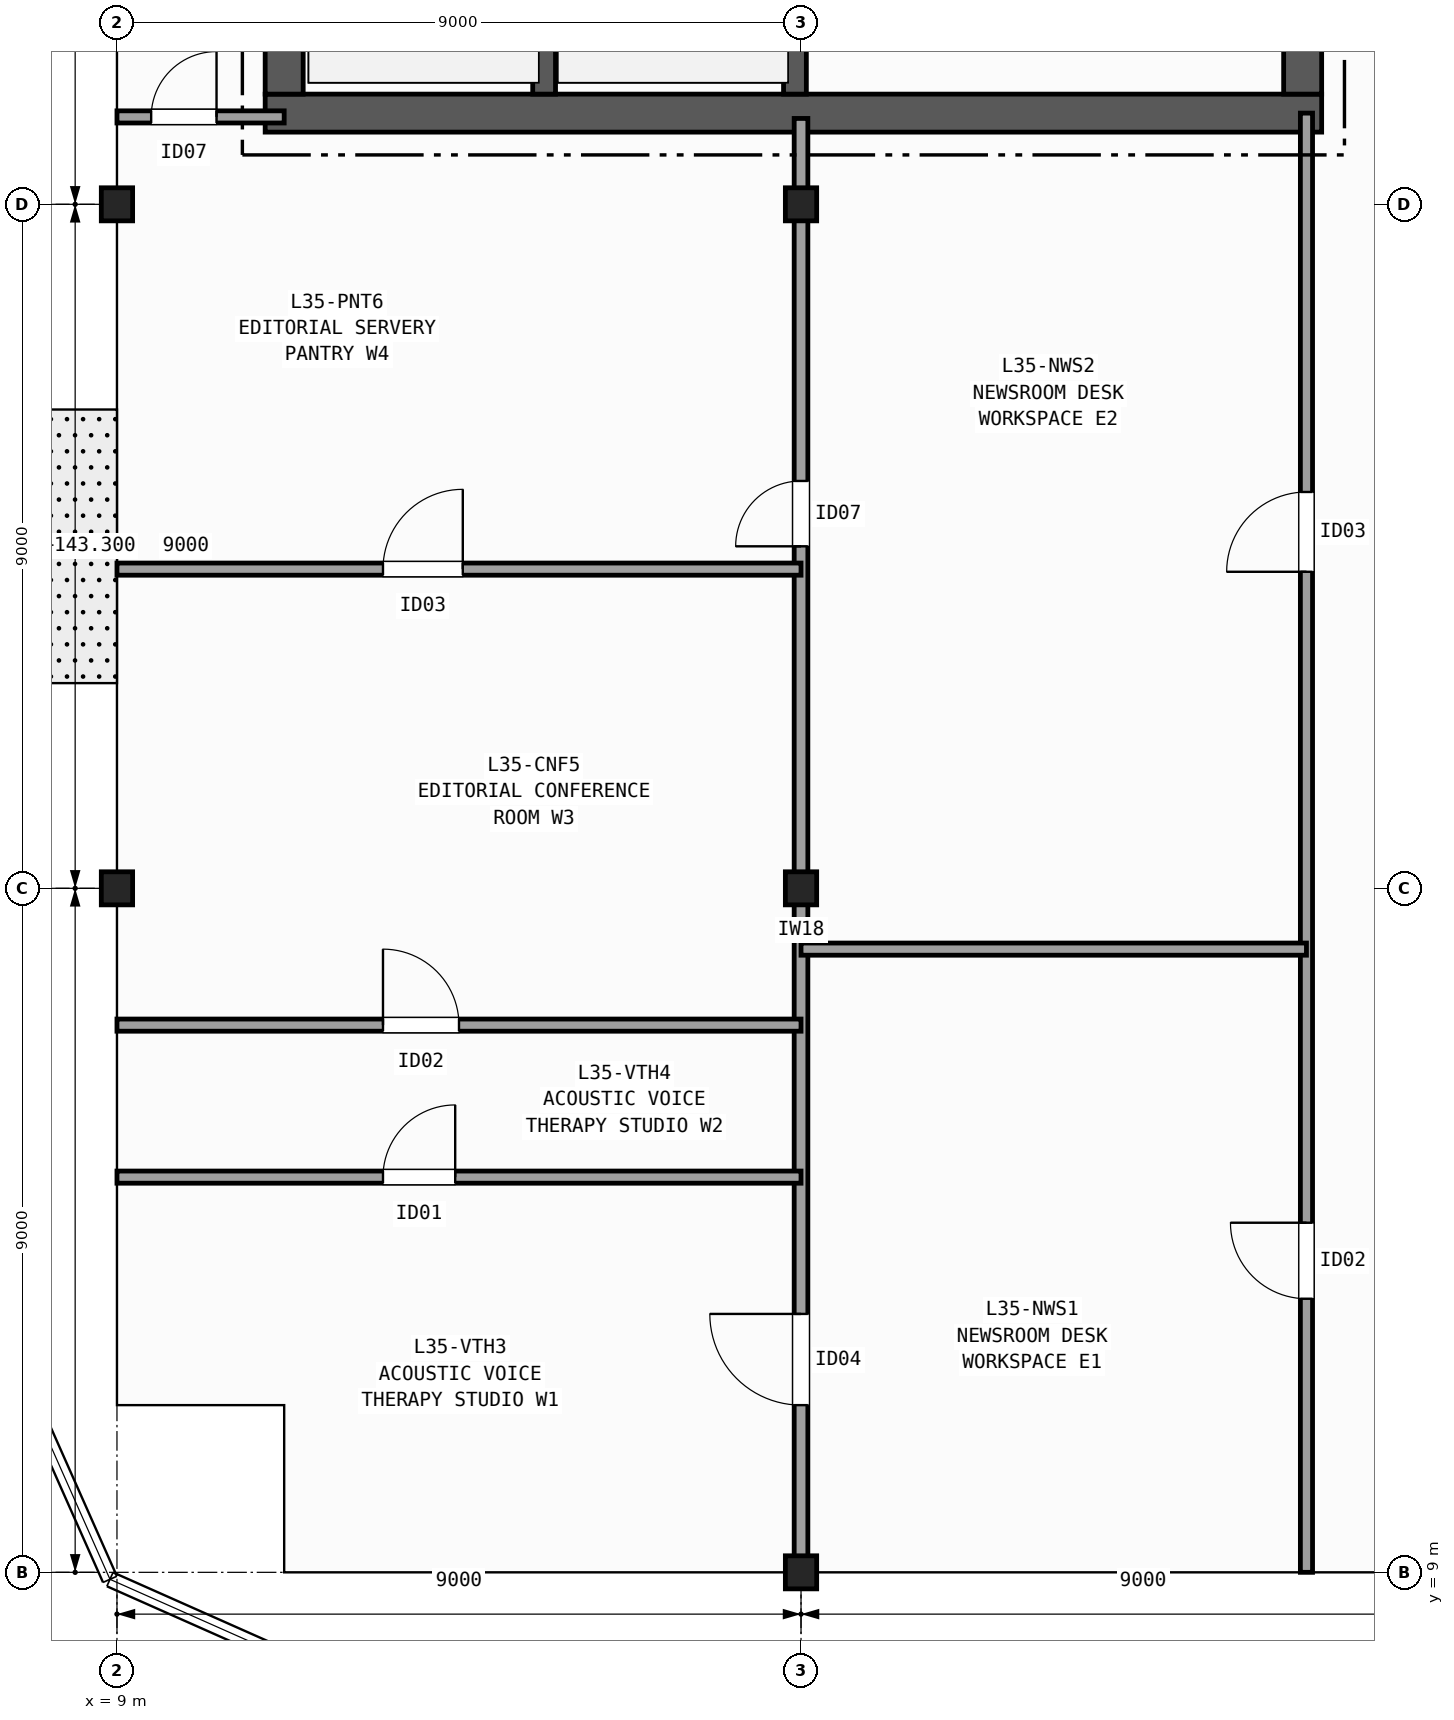
"""IFC4 building model, lengths in metres.
Left out: names, types, materials, properties, quantities, classifications, styles, units other than length and angle.
Written with IfcOpenShell. Run it as: python <this file> out.ifc"""

import sys

from ifc_helpers import new_model, si_unit, direction, frame, frame_2d, origin, origin_2d, place, context, subcontext, project, spatial, rectangle, i_section, extrude, element, fill, save


model = new_model("IFC4")
c1 = context("Model", 3, precision=1e-05, world=origin(), true_north=direction((0.0, 1.0)))
c2 = subcontext(c1, "Body", "Model", "MODEL_VIEW")
j1 = project(units=[si_unit("LENGTHUNIT", "METRE"), si_unit("PLANEANGLEUNIT", "RADIAN")], contexts=[c1])
p1 = place(None, origin())
s1 = spatial("IfcSite", under=j1, at=p1, CompositionType="ELEMENT")
p2 = place(p1, origin())
s2 = spatial("IfcBuilding", under=s1, at=p2, CompositionType="ELEMENT")
p3 = place(p2, frame((0.0, 0.0, 143.3)))
s3 = spatial("IfcBuildingStorey", under=s2, at=p3, CompositionType="ELEMENT", Elevation=143.3)
for number, where, z_axis, x_axis in (
    (1, (9.0, 18.0, 0.0), (0.0, 0.0, 1.0), (1.0, 0.0, 0.0)),
    (2, (9.0, 27.0, 0.0), (0.0, 0.0, 1.0), (1.0, 0.0, 0.0)),
    (3, (18.0, 9.0, 0.0), (0.0, 0.0, 1.0), (1.0, 0.0, 0.0)),
    (4, (18.0, 18.0, 0.0), (0.0, 0.0, 1.0), (1.0, 0.0, 0.0)),
    (5, (18.0, 27.0, 0.0), (0.0, 0.0, 1.0), (1.0, 0.0, 0.0)),
):
    element("IfcColumn", number, at=place(p3, frame(where, z_axis=z_axis, x_axis=x_axis)), inside=s3, PredefinedType="COLUMN", context=c2, shape_type="SweptSolid", body=[
        extrude(i_section(OverallWidth=0.412, OverallDepth=0.435, WebThickness=0.036, FlangeThickness=0.057, FilletRadius=0.015, at=origin_2d()), origin(), (0.0, 0.0, 1.0), 3.7),
    ])
p4 = place(p3, frame((10.95, 28.2, 0.0), z_axis=(0.0, 0.0, 1.0), x_axis=(1.0, 0.0, 0.0)))
e6 = element("IfcWall", 6, at=p4, inside=s3, PredefinedType="SHEAR", context=c2, shape_type="SweptSolid", body=[
    extrude(rectangle(XDim=13.9, YDim=0.5, at=frame_2d((6.95, 0.0))), origin(), (0.0, 0.0, 1.0), 3.42),
])
p5 = place(p3, frame((11.2, 42.15, 0.0), z_axis=(0.0, 0.0, 1.0), x_axis=(0.0, -1.0, 0.0)))
e7 = element("IfcWall", 7, at=p5, inside=s3, PredefinedType="SHEAR", context=c2, shape_type="SweptSolid", body=[
    extrude(rectangle(XDim=13.7, YDim=0.5, at=frame_2d((6.85, 0.0))), origin(), (0.0, 0.0, 1.0), 3.42),
])
p6 = place(p3, frame((24.6, 28.45, 0.0), z_axis=(0.0, 0.0, 1.0), x_axis=(0.0, 1.0, 0.0)))
e8 = element("IfcWall", 8, at=p6, inside=s3, PredefinedType="SHEAR", context=c2, shape_type="SweptSolid", body=[
    extrude(rectangle(XDim=13.7, YDim=0.5, at=frame_2d((6.85, 0.0))), origin(), (0.0, 0.0, 1.0), 3.42),
])
p7 = place(p6, frame((3.35, 0.0, 0.0)))
e9 = element("IfcOpeningElement", 9, at=p7, cuts=e8, PredefinedType="OPENING", context=c2, shape_type="SweptSolid", body=[
    extrude(rectangle(XDim=1.5, YDim=2.2, at=frame_2d((0.75, 1.1))), frame((0.0, 0.26, 0.0), z_axis=(0.0, -1.0, 0.0), x_axis=(1.0, 0.0, 0.0)), (0.0, 0.0, 1.0), 0.52),
])
p8 = place(p6, frame((9.95, 0.0, 0.0)))
e10 = element("IfcOpeningElement", 10, at=p8, cuts=e8, PredefinedType="OPENING", context=c2, shape_type="SweptSolid", body=[
    extrude(rectangle(XDim=0.9, YDim=2.1, at=frame_2d((0.45, 1.05))), frame((0.0, 0.26, 0.0), z_axis=(0.0, -1.0, 0.0), x_axis=(1.0, 0.0, 0.0)), (0.0, 0.0, 1.0), 0.52),
])
p9 = place(p6, frame((12.05, 0.0, 0.0)))
e11 = element("IfcOpeningElement", 11, at=p9, cuts=e8, PredefinedType="OPENING", context=c2, shape_type="SweptSolid", body=[
    extrude(rectangle(XDim=0.9, YDim=2.1, at=frame_2d((0.45, 1.05))), frame((0.0, 0.26, 0.0), z_axis=(0.0, -1.0, 0.0), x_axis=(1.0, 0.0, 0.0)), (0.0, 0.0, 1.0), 0.52),
])
p10 = place(p3, frame((14.62, 28.45, 0.0), z_axis=(0.0, 0.0, 1.0), x_axis=(0.0, 1.0, 0.0)))
e12 = element("IfcWall", 12, at=p10, inside=s3, PredefinedType="SHEAR", context=c2, shape_type="SweptSolid", body=[
    extrude(rectangle(XDim=9.0, YDim=0.3, at=frame_2d((4.5, 0.0))), origin(), (0.0, 0.0, 1.0), 3.42),
])
p11 = place(p3, frame((17.92, 42.15, 0.0), z_axis=(0.0, 0.0, 1.0), x_axis=(0.0, -1.0, 0.0)))
e13 = element("IfcWall", 13, at=p11, inside=s3, PredefinedType="SHEAR", context=c2, shape_type="SweptSolid", body=[
    extrude(rectangle(XDim=13.7, YDim=0.3, at=frame_2d((6.85, 0.0))), origin(), (0.0, 0.0, 1.0), 3.42),
])
p12 = place(p11, frame((1.975, 0.0, 0.0)))
e14 = element("IfcOpeningElement", 14, at=p12, cuts=e13, PredefinedType="OPENING", context=c2, shape_type="SweptSolid", body=[
    extrude(rectangle(XDim=1.15, YDim=2.15, at=frame_2d((0.575, 1.075))), frame((0.0, 0.16, 0.0), z_axis=(0.0, -1.0, 0.0), x_axis=(1.0, 0.0, 0.0)), (0.0, 0.0, 1.0), 0.32),
])
p13 = place(p3, frame((9.0, 28.15, 0.0), z_axis=(0.0, 0.0, 1.0), x_axis=(1.0, 0.0, 0.0)))
e15 = element("IfcWall", 15, at=p13, inside=s3, PredefinedType="PARTITIONING", context=c2, shape_type="SweptSolid", body=[
    extrude(rectangle(XDim=2.2, YDim=0.16, at=frame_2d((1.1, 0.0))), origin(), (0.0, 0.0, 1.0), 2.634),
])
p14 = place(p13, frame((0.45, 0.0, 0.0)))
e16 = element("IfcOpeningElement", 16, at=p14, cuts=e15, PredefinedType="OPENING", context=c2, shape_type="SweptSolid", body=[
    extrude(rectangle(XDim=0.86, YDim=2.05, at=frame_2d((0.43, 1.025))), frame((0.0, 0.09, 0.0), z_axis=(0.0, -1.0, 0.0), x_axis=(1.0, 0.0, 0.0)), (0.0, 0.0, 1.0), 0.18),
])
p15 = place(p3, frame((24.65, 9.0, 0.0), z_axis=(0.0, 0.0, 1.0), x_axis=(0.0, 1.0, 0.0)))
e17 = element("IfcWall", 17, at=p15, inside=s3, PredefinedType="PARTITIONING", context=c2, shape_type="SweptSolid", body=[
    extrude(rectangle(XDim=19.2, YDim=0.16, at=frame_2d((9.6, 0.0))), origin(), (0.0, 0.0, 1.0), 2.634),
])
p16 = place(p15, frame((3.6, 0.0, 0.0)))
e18 = element("IfcOpeningElement", 18, at=p16, cuts=e17, PredefinedType="OPENING", context=c2, shape_type="SweptSolid", body=[
    extrude(rectangle(XDim=1.0, YDim=2.1, at=frame_2d((0.5, 1.05))), frame((0.0, 0.09, 0.0), z_axis=(0.0, -1.0, 0.0), x_axis=(1.0, 0.0, 0.0)), (0.0, 0.0, 1.0), 0.18),
])
p17 = place(p15, frame((13.165, 0.0, 0.0)))
e19 = element("IfcOpeningElement", 19, at=p17, cuts=e17, PredefinedType="OPENING", context=c2, shape_type="SweptSolid", body=[
    extrude(rectangle(XDim=1.05, YDim=2.15, at=frame_2d((0.525, 1.075))), frame((0.0, 0.09, 0.0), z_axis=(0.0, -1.0, 0.0), x_axis=(1.0, 0.0, 0.0)), (0.0, 0.0, 1.0), 0.18),
])
p18 = place(p3, frame((18.0, 9.0, 0.0), z_axis=(0.0, 0.0, 1.0), x_axis=(0.0, 1.0, 0.0)))
e20 = element("IfcWall", 20, at=p18, inside=s3, PredefinedType="PARTITIONING", context=c2, shape_type="SweptSolid", body=[
    extrude(rectangle(XDim=19.13, YDim=0.18, at=frame_2d((9.565, 0.0))), origin(), (0.0, 0.0, 1.0), 2.634),
])
p19 = place(p18, frame((2.2, 0.0, 0.0)))
e21 = element("IfcOpeningElement", 21, at=p19, cuts=e20, PredefinedType="OPENING", context=c2, shape_type="SweptSolid", body=[
    extrude(rectangle(XDim=1.2, YDim=2.15, at=frame_2d((0.6, 1.075))), frame((0.0, 0.1, 0.0), z_axis=(0.0, -1.0, 0.0), x_axis=(1.0, 0.0, 0.0)), (0.0, 0.0, 1.0), 0.2),
])
p20 = place(p18, frame((13.5, 0.0, 0.0)))
e22 = element("IfcOpeningElement", 22, at=p20, cuts=e20, PredefinedType="OPENING", context=c2, shape_type="SweptSolid", body=[
    extrude(rectangle(XDim=0.86, YDim=2.05, at=frame_2d((0.43, 1.025))), frame((0.0, 0.1, 0.0), z_axis=(0.0, -1.0, 0.0), x_axis=(1.0, 0.0, 0.0)), (0.0, 0.0, 1.0), 0.2),
])
p21 = place(p3, frame((18.0, 17.2, 0.0), z_axis=(0.0, 0.0, 1.0), x_axis=(1.0, 0.0, 0.0)))
e23 = element("IfcWall", 23, at=p21, inside=s3, PredefinedType="PARTITIONING", context=c2, shape_type="SweptSolid", body=[
    extrude(rectangle(XDim=6.65, YDim=0.16, at=frame_2d((3.325, 0.0))), origin(), (0.0, 0.0, 1.0), 2.789),
])
p22 = place(p3, frame((9.0, 14.2, 0.0), z_axis=(0.0, 0.0, 1.0), x_axis=(1.0, 0.0, 0.0)))
e24 = element("IfcWall", 24, at=p22, inside=s3, PredefinedType="PARTITIONING", context=c2, shape_type="SweptSolid", body=[
    extrude(rectangle(XDim=9.0, YDim=0.16, at=frame_2d((4.5, 0.0))), origin(), (0.0, 0.0, 1.0), 2.792),
])
p23 = place(p22, frame((3.5, 0.0, 0.0)))
e25 = element("IfcOpeningElement", 25, at=p23, cuts=e24, PredefinedType="OPENING", context=c2, shape_type="SweptSolid", body=[
    extrude(rectangle(XDim=0.95, YDim=2.1, at=frame_2d((0.475, 1.05))), frame((0.0, 0.09, 0.0), z_axis=(0.0, -1.0, 0.0), x_axis=(1.0, 0.0, 0.0)), (0.0, 0.0, 1.0), 0.18),
])
p24 = place(p3, frame((9.0, 16.2, 0.0), z_axis=(0.0, 0.0, 1.0), x_axis=(1.0, 0.0, 0.0)))
e26 = element("IfcWall", 26, at=p24, inside=s3, PredefinedType="PARTITIONING", context=c2, shape_type="SweptSolid", body=[
    extrude(rectangle(XDim=9.0, YDim=0.16, at=frame_2d((4.5, 0.0))), origin(), (0.0, 0.0, 1.0), 2.792),
])
p25 = place(p24, frame((3.5, 0.0, 0.0)))
e27 = element("IfcOpeningElement", 27, at=p25, cuts=e26, PredefinedType="OPENING", context=c2, shape_type="SweptSolid", body=[
    extrude(rectangle(XDim=1.0, YDim=2.1, at=frame_2d((0.5, 1.05))), frame((0.0, 0.09, 0.0), z_axis=(0.0, -1.0, 0.0), x_axis=(1.0, 0.0, 0.0)), (0.0, 0.0, 1.0), 0.18),
])
p26 = place(p3, frame((9.0, 22.2, 0.0), z_axis=(0.0, 0.0, 1.0), x_axis=(1.0, 0.0, 0.0)))
e28 = element("IfcWall", 28, at=p26, inside=s3, PredefinedType="PARTITIONING", context=c2, shape_type="SweptSolid", body=[
    extrude(rectangle(XDim=9.0, YDim=0.16, at=frame_2d((4.5, 0.0))), origin(), (0.0, 0.0, 1.0), 2.634),
])
p27 = place(p26, frame((3.5, 0.0, 0.0)))
e29 = element("IfcOpeningElement", 29, at=p27, cuts=e28, PredefinedType="OPENING", context=c2, shape_type="SweptSolid", body=[
    extrude(rectangle(XDim=1.05, YDim=2.15, at=frame_2d((0.525, 1.075))), frame((0.0, 0.09, 0.0), z_axis=(0.0, -1.0, 0.0), x_axis=(1.0, 0.0, 0.0)), (0.0, 0.0, 1.0), 0.18),
])
p28 = place(p14, origin())
e30 = element("IfcDoor", 30, at=p28, inside=s3, OperationType="SINGLE_SWING_RIGHT", PredefinedType="DOOR", context=c2, shape_type="SweptSolid", body=[
    extrude(rectangle(XDim=0.86, YDim=2.05, at=frame_2d((0.43, 1.025))), frame((0.0, 0.025, 0.0), z_axis=(0.0, -1.0, 0.0), x_axis=(1.0, 0.0, 0.0)), (0.0, 0.0, 1.0), 0.05),
])
fill(e16, e30)
p29 = place(p16, origin())
e31 = element("IfcDoor", 31, at=p29, inside=s3, OperationType="SINGLE_SWING_RIGHT", PredefinedType="DOOR", context=c2, shape_type="SweptSolid", body=[
    extrude(rectangle(XDim=1.0, YDim=2.1, at=frame_2d((0.5, 1.05))), frame((0.0, 0.025, 0.0), z_axis=(0.0, -1.0, 0.0), x_axis=(1.0, 0.0, 0.0)), (0.0, 0.0, 1.0), 0.05),
])
fill(e18, e31)
p30 = place(p17, origin())
e32 = element("IfcDoor", 32, at=p30, inside=s3, OperationType="SINGLE_SWING_LEFT", PredefinedType="DOOR", context=c2, shape_type="SweptSolid", body=[
    extrude(rectangle(XDim=1.05, YDim=2.15, at=frame_2d((0.525, 1.075))), frame((0.0, 0.025, 0.0), z_axis=(0.0, -1.0, 0.0), x_axis=(1.0, 0.0, 0.0)), (0.0, 0.0, 1.0), 0.05),
])
fill(e19, e32)
p31 = place(p19, origin())
e33 = element("IfcDoor", 33, at=p31, inside=s3, OperationType="SINGLE_SWING_RIGHT", PredefinedType="DOOR", context=c2, shape_type="SweptSolid", body=[
    extrude(rectangle(XDim=1.2, YDim=2.15, at=frame_2d((0.6, 1.075))), frame((0.0, 0.025, 0.0), z_axis=(0.0, -1.0, 0.0), x_axis=(1.0, 0.0, 0.0)), (0.0, 0.0, 1.0), 0.05),
])
fill(e21, e33)
p32 = place(p20, origin())
e34 = element("IfcDoor", 34, at=p32, inside=s3, OperationType="SINGLE_SWING_LEFT", PredefinedType="DOOR", context=c2, shape_type="SweptSolid", body=[
    extrude(rectangle(XDim=0.86, YDim=2.05, at=frame_2d((0.43, 1.025))), frame((0.0, 0.025, 0.0), z_axis=(0.0, -1.0, 0.0), x_axis=(1.0, 0.0, 0.0)), (0.0, 0.0, 1.0), 0.05),
])
fill(e22, e34)
p33 = place(p23, origin())
e35 = element("IfcDoor", 35, at=p33, inside=s3, OperationType="SINGLE_SWING_RIGHT", PredefinedType="DOOR", context=c2, shape_type="SweptSolid", body=[
    extrude(rectangle(XDim=0.95, YDim=2.1, at=frame_2d((0.475, 1.05))), frame((0.0, 0.025, 0.0), z_axis=(0.0, -1.0, 0.0), x_axis=(1.0, 0.0, 0.0)), (0.0, 0.0, 1.0), 0.05),
])
fill(e25, e35)
p34 = place(p25, origin())
e36 = element("IfcDoor", 36, at=p34, inside=s3, OperationType="SINGLE_SWING_LEFT", PredefinedType="DOOR", context=c2, shape_type="SweptSolid", body=[
    extrude(rectangle(XDim=1.0, YDim=2.1, at=frame_2d((0.5, 1.05))), frame((0.0, 0.025, 0.0), z_axis=(0.0, -1.0, 0.0), x_axis=(1.0, 0.0, 0.0)), (0.0, 0.0, 1.0), 0.05),
])
fill(e27, e36)
p35 = place(p27, origin())
e37 = element("IfcDoor", 37, at=p35, inside=s3, OperationType="SINGLE_SWING_RIGHT", PredefinedType="DOOR", context=c2, shape_type="SweptSolid", body=[
    extrude(rectangle(XDim=1.05, YDim=2.15, at=frame_2d((0.525, 1.075))), frame((0.0, 0.025, 0.0), z_axis=(0.0, -1.0, 0.0), x_axis=(1.0, 0.0, 0.0)), (0.0, 0.0, 1.0), 0.05),
])
fill(e29, e37)
save(model, sys.argv[1])
